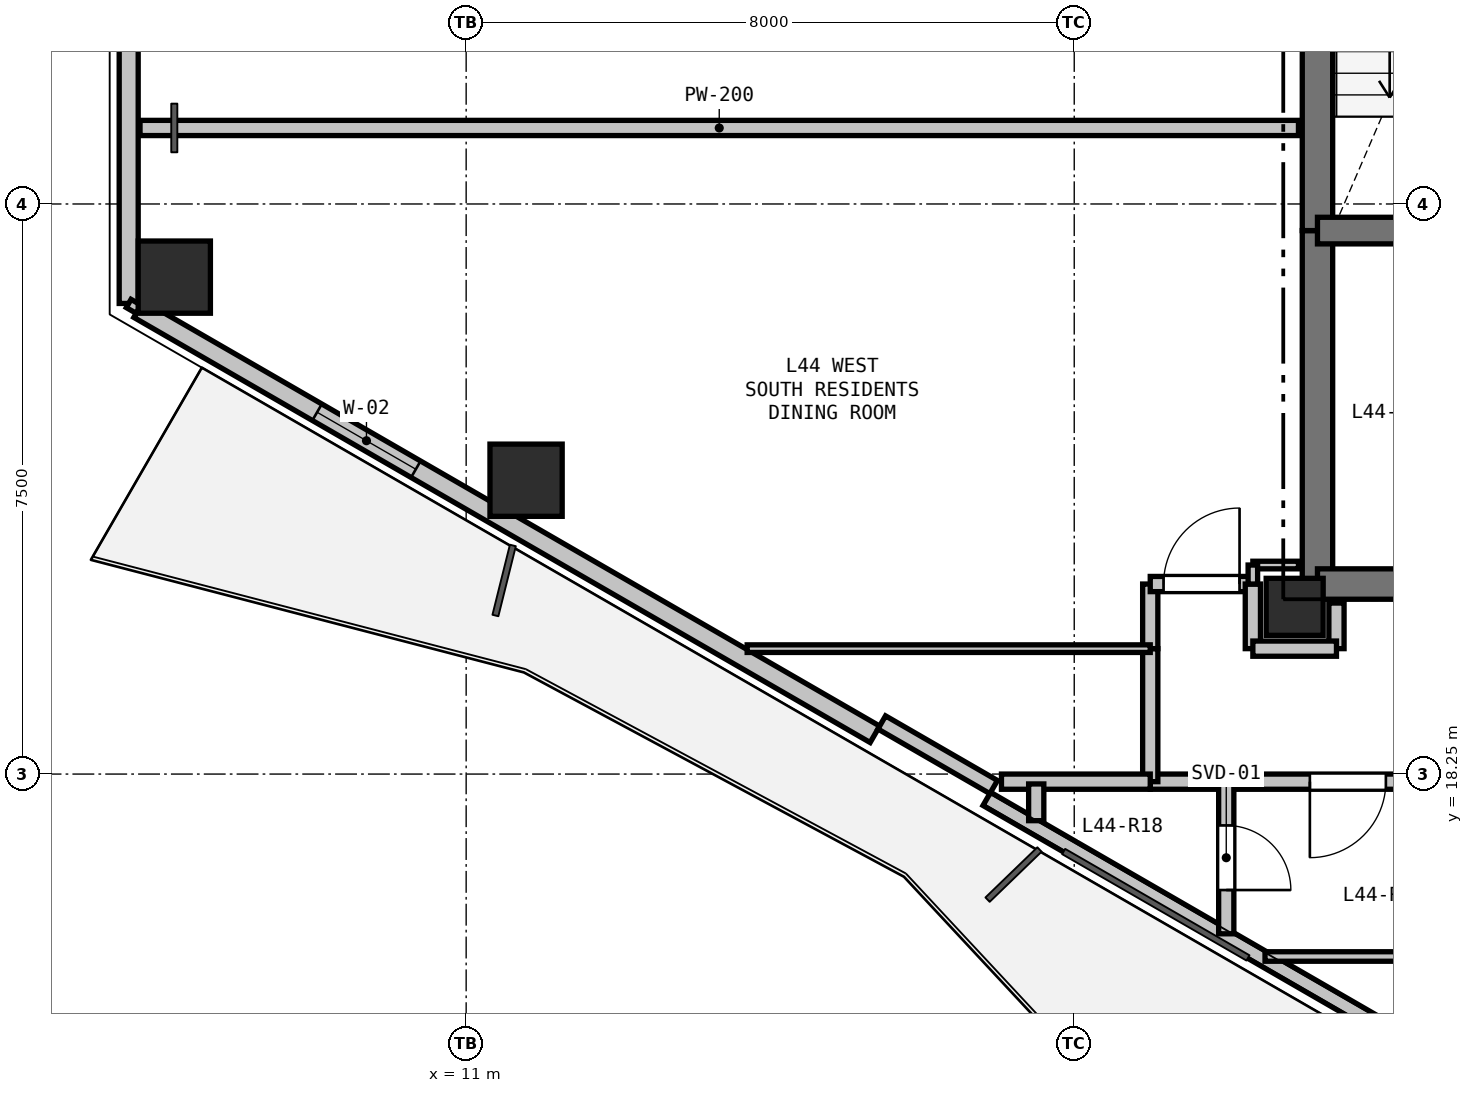
"""IFC4 building model, lengths in metres.
Left out: names, types, materials, properties, quantities, classifications, styles, units other than length and angle.
Written with IfcOpenShell. Run it as: python <this file> out.ifc"""

import sys

from ifc_helpers import new_model, si_unit, direction, frame, frame_2d, origin, origin_2d, place, context, subcontext, project, spatial, rectangle, hollow_rectangle, extrude, element, fill, save


model = new_model("IFC4")
c1 = context("Model", 3, precision=1e-05, world=origin(), true_north=direction((0.0, 1.0)))
c2 = subcontext(c1, "Body", "Model", "MODEL_VIEW")
j1 = project(units=[si_unit("LENGTHUNIT", "METRE"), si_unit("PLANEANGLEUNIT", "RADIAN")], contexts=[c1])
p1 = place(None, origin())
s1 = spatial("IfcSite", under=j1, at=p1, CompositionType="ELEMENT")
p2 = place(p1, origin())
s2 = spatial("IfcBuilding", under=s1, at=p2, CompositionType="ELEMENT")
p3 = place(p2, frame((0.0, 0.0, 157.5)))
s3 = spatial("IfcBuildingStorey", under=s2, at=p3, CompositionType="ELEMENT", Elevation=157.5)
p4 = place(p3, frame((21.9, 20.45, 0.0), z_axis=(0.0, 0.0, 1.0), x_axis=(1.0, 0.0, 0.0)))
e1 = element("IfcColumn", 1, at=p4, inside=s3, PredefinedType="COLUMN", context=c2, shape_type="SweptSolid", body=[
    extrude(rectangle(XDim=0.75, YDim=0.75, at=origin_2d()), origin(), (0.0, 0.0, 1.0), 3.3),
])
for number, where, z_axis, x_axis in (
    (2, (11.788, 22.116, 0.0), (0.0, 0.0, 1.0), (1.0, 0.0, 0.0)),
    (3, (7.16, 24.788, 0.0), (0.0, 0.0, 1.0), (1.0, 0.0, 0.0)),
):
    element("IfcColumn", number, at=place(p3, frame(where, z_axis=z_axis, x_axis=x_axis)), inside=s3, PredefinedType="COLUMN", context=c2, shape_type="SweptSolid", body=[
        extrude(hollow_rectangle(XDim=0.95, YDim=0.95, WallThickness=0.028, at=origin_2d()), origin(), (0.0, 0.0, 1.0), 3.3),
    ])
p5 = place(p3, frame((6.56, 24.441, 0.0), z_axis=(0.0, 0.0, 1.0), x_axis=(0.0, 1.0, 0.0)))
e4 = element("IfcWall", 4, at=p5, inside=s3, PredefinedType="SOLIDWALL", context=c2, shape_type="SweptSolid", body=[
    extrude(rectangle(XDim=4.617, YDim=0.25, at=frame_2d((2.309, 0.0))), origin(), (0.0, 0.0, 1.0), 2.6),
])
p6 = place(p3, frame((26.931, 12.68, 0.0), z_axis=(0.0, 0.0, 1.0), x_axis=(-0.866026619769, 0.499997893847, 0.0)))
e5 = element("IfcWall", 5, at=p6, inside=s3, PredefinedType="PARAPET", context=c2, shape_type="SweptSolid", body=[
    extrude(rectangle(XDim=10.486, YDim=0.2, at=frame_2d((5.243, 0.0))), origin(), (0.0, 0.0, 1.0), 0.2),
])
p7 = place(p3, frame((16.378, 18.773, 0.0), z_axis=(0.0, 0.0, 1.0), x_axis=(-0.866027848477, 0.499995765644, 0.0)))
e6 = element("IfcWall", 6, at=p7, inside=s3, PredefinedType="SOLIDWALL", context=c2, shape_type="SweptSolid", body=[
    extrude(rectangle(XDim=11.186, YDim=0.25, at=frame_2d((5.593, 0.0))), origin(), (0.0, 0.0, 1.0), 2.6),
])
p8 = place(p7, frame((6.974, 0.0, 0.9)))
e7 = element("IfcOpeningElement", 7, at=p8, cuts=e6, PredefinedType="OPENING", context=c2, shape_type="SweptSolid", body=[
    extrude(rectangle(XDim=1.5, YDim=1.5, at=frame_2d((0.75, 0.75))), frame((0.0, 0.135, 0.0), z_axis=(0.0, -1.0, 0.0), x_axis=(1.0, 0.0, 0.0)), (0.0, 0.0, 1.0), 0.27),
])
p9 = place(p3, frame((17.94, 18.079, 0.0), z_axis=(0.0, 0.0, 1.0), x_axis=(-0.865989465428, 0.500062241894, 0.0)))
e8 = element("IfcWall", 8, at=p9, inside=s3, PredefinedType="PARAPET", context=c2, shape_type="SweptSolid", body=[
    extrude(rectangle(XDim=1.7, YDim=0.2, at=frame_2d((0.85, 0.0))), origin(), (0.0, 0.0, 1.0), 2.6),
])
p10 = place(p3, frame((22.2, 20.75, 0.0), z_axis=(0.0, 0.0, 1.0), x_axis=(0.0, 1.0, 0.0)))
e9 = element("IfcWall", 9, at=p10, inside=s3, PredefinedType="SHEAR", context=c2, shape_type="SweptSolid", body=[
    extrude(rectangle(XDim=4.65, YDim=0.4, at=frame_2d((2.325, 0.0))), origin(), (0.0, 0.0, 1.0), 2.98),
])
p11 = place(p3, frame((22.2, 25.4, 0.0), z_axis=(0.0, 0.0, 1.0), x_axis=(0.0, 1.0, 0.0)))
e10 = element("IfcWall", 10, at=p11, inside=s3, PredefinedType="SHEAR", context=c2, shape_type="SweptSolid", body=[
    extrude(rectangle(XDim=7.35, YDim=0.4, at=frame_2d((3.675, 0.0))), origin(), (0.0, 0.0, 1.0), 2.98),
])
p12 = place(p3, frame((25.65, 20.75, 0.0), z_axis=(0.0, 0.0, 1.0), x_axis=(-1.0, 0.0, 0.0)))
e11 = element("IfcWall", 11, at=p12, inside=s3, PredefinedType="SHEAR", context=c2, shape_type="SweptSolid", body=[
    extrude(rectangle(XDim=3.45, YDim=0.4, at=frame_2d((1.725, 0.0))), origin(), (0.0, 0.0, 1.0), 2.98),
])
p13 = place(p12, frame((0.65, 0.0, 0.0)))
e12 = element("IfcOpeningElement", 12, at=p13, cuts=e11, PredefinedType="OPENING", context=c2, shape_type="SweptSolid", body=[
    extrude(rectangle(XDim=1.15, YDim=2.15, at=frame_2d((0.575, 1.075))), frame((0.0, 0.21, 0.0), z_axis=(0.0, -1.0, 0.0), x_axis=(1.0, 0.0, 0.0)), (0.0, 0.0, 1.0), 0.42),
])
p14 = place(p3, frame((22.2, 25.4, 0.0), z_axis=(0.0, 0.0, 1.0), x_axis=(1.0, 0.0, 0.0)))
e13 = element("IfcWall", 13, at=p14, inside=s3, PredefinedType="SHEAR", context=c2, shape_type="SweptSolid", body=[
    extrude(rectangle(XDim=3.45, YDim=0.35, at=frame_2d((1.725, 0.0))), origin(), (0.0, 0.0, 1.0), 2.98),
])
p15 = place(p14, frame((1.15, 0.0, 0.0)))
e14 = element("IfcOpeningElement", 14, at=p15, cuts=e13, PredefinedType="OPENING", context=c2, shape_type="SweptSolid", body=[
    extrude(rectangle(XDim=1.15, YDim=2.15, at=frame_2d((0.575, 1.075))), frame((0.0, 0.185, 0.0), z_axis=(0.0, -1.0, 0.0), x_axis=(1.0, 0.0, 0.0)), (0.0, 0.0, 1.0), 0.37),
])
p16 = place(p3, frame((22.45, 19.9, 0.0), z_axis=(0.0, 0.0, 1.0), x_axis=(0.0, 1.0, 0.0)))
e15 = element("IfcWall", 15, at=p16, inside=s3, PredefinedType="PARTITIONING", context=c2, shape_type="SweptSolid", body=[
    extrude(rectangle(XDim=0.6, YDim=0.2, at=frame_2d((0.3, 0.0))), origin(), (0.0, 0.0, 1.0), 2.428),
])
p17 = place(p3, frame((24.2, 18.15, 0.0), z_axis=(0.0, 0.0, 1.0), x_axis=(-1.0, 0.0, 0.0)))
e16 = element("IfcWall", 16, at=p17, inside=s3, PredefinedType="PARTITIONING", context=c2, shape_type="SweptSolid", body=[
    extrude(rectangle(XDim=3.2, YDim=0.2, at=frame_2d((1.6, 0.0))), origin(), (0.0, 0.0, 1.0), 2.428),
])
p18 = place(p17, frame((1.1, 0.0, 0.0)))
e17 = element("IfcOpeningElement", 17, at=p18, cuts=e16, PredefinedType="OPENING", context=c2, shape_type="SweptSolid", body=[
    extrude(rectangle(XDim=1.0, YDim=2.15, at=frame_2d((0.5, 1.075))), frame((0.0, 0.11, 0.0), z_axis=(0.0, -1.0, 0.0), x_axis=(1.0, 0.0, 0.0)), (0.0, 0.0, 1.0), 0.22),
])
p19 = place(p3, frame((21.0, 18.15, 0.0), z_axis=(0.0, 0.0, 1.0), x_axis=(-1.0, 0.0, 0.0)))
e18 = element("IfcWall", 18, at=p19, inside=s3, PredefinedType="PARTITIONING", context=c2, shape_type="SweptSolid", body=[
    extrude(rectangle(XDim=1.0, YDim=0.2, at=frame_2d((0.5, 0.0))), origin(), (0.0, 0.0, 1.0), 2.98),
])
p20 = place(p3, frame((20.0, 18.15, 0.0), z_axis=(0.0, 0.0, 1.0), x_axis=(0.0, 1.0, 0.0)))
e19 = element("IfcWall", 19, at=p20, inside=s3, PredefinedType="PARTITIONING", context=c2, shape_type="SweptSolid", body=[
    extrude(rectangle(XDim=1.75, YDim=0.2, at=frame_2d((0.875, 0.0))), origin(), (0.0, 0.0, 1.0), 2.98),
])
p21 = place(p3, frame((20.0, 19.9, 0.0), z_axis=(0.0, 0.0, 1.0), x_axis=(0.0, 1.0, 0.0)))
e20 = element("IfcWall", 20, at=p21, inside=s3, PredefinedType="PARTITIONING", context=c2, shape_type="SweptSolid", body=[
    extrude(rectangle(XDim=0.85, YDim=0.2, at=frame_2d((0.425, 0.0))), origin(), (0.0, 0.0, 1.0), 2.98),
])
p22 = place(p3, frame((20.0, 20.75, 0.0), z_axis=(0.0, 0.0, 1.0), x_axis=(1.0, 0.0, 0.0)))
e21 = element("IfcWall", 21, at=p22, inside=s3, PredefinedType="PARTITIONING", context=c2, shape_type="SweptSolid", body=[
    extrude(rectangle(XDim=1.35, YDim=0.2, at=frame_2d((0.675, 0.0))), origin(), (0.0, 0.0, 1.0), 2.428),
])
p23 = place(p22, frame((0.175, 0.0, 0.0)))
e22 = element("IfcOpeningElement", 22, at=p23, cuts=e21, PredefinedType="OPENING", context=c2, shape_type="SweptSolid", body=[
    extrude(rectangle(XDim=1.0, YDim=2.15, at=frame_2d((0.5, 1.075))), frame((0.0, 0.11, 0.0), z_axis=(0.0, -1.0, 0.0), x_axis=(1.0, 0.0, 0.0)), (0.0, 0.0, 1.0), 0.22),
])
p24 = place(p3, frame((21.35, 20.75, 0.0), z_axis=(0.0, 0.0, 1.0), x_axis=(0.0, -1.0, 0.0)))
e23 = element("IfcWall", 23, at=p24, inside=s3, PredefinedType="PARTITIONING", context=c2, shape_type="SweptSolid", body=[
    extrude(rectangle(XDim=0.85, YDim=0.2, at=frame_2d((0.425, 0.0))), origin(), (0.0, 0.0, 1.0), 2.428),
])
p25 = place(p3, frame((21.35, 19.9, 0.0), z_axis=(0.0, 0.0, 1.0), x_axis=(1.0, 0.0, 0.0)))
e24 = element("IfcWall", 24, at=p25, inside=s3, PredefinedType="PARTITIONING", context=c2, shape_type="SweptSolid", body=[
    extrude(rectangle(XDim=1.1, YDim=0.2, at=frame_2d((0.55, 0.0))), origin(), (0.0, 0.0, 1.0), 2.428),
])
p26 = place(p3, frame((6.709, 26.75, 0.0), z_axis=(0.0, 0.0, 1.0), x_axis=(1.0, 0.0, 0.0)))
e25 = element("IfcWall", 25, at=p26, inside=s3, PredefinedType="PARTITIONING", context=c2, shape_type="SweptSolid", body=[
    extrude(rectangle(XDim=15.241, YDim=0.2, at=frame_2d((7.62, 0.0))), origin(), (0.0, 0.0, 1.0), 2.505),
])
p27 = place(p3, frame((21.95, 21.0, 0.0), z_axis=(0.0, 0.0, 1.0), x_axis=(-1.0, 0.0, 0.0)))
e26 = element("IfcWall", 26, at=p27, inside=s3, PredefinedType="PARTITIONING", context=c2, shape_type="SweptSolid", body=[
    extrude(rectangle(XDim=0.6, YDim=0.1, at=frame_2d((0.3, 0.0))), origin(), (0.0, 0.0, 1.0), 2.505),
])
p28 = place(p3, frame((21.35, 21.0, 0.0), z_axis=(0.0, 0.0, 1.0), x_axis=(0.0, -1.0, 0.0)))
e27 = element("IfcWall", 27, at=p28, inside=s3, PredefinedType="PARTITIONING", context=c2, shape_type="SweptSolid", body=[
    extrude(rectangle(XDim=0.25, YDim=0.125, at=frame_2d((0.125, 0.0))), origin(), (0.0, 0.0, 1.0), 2.98),
])
p29 = place(p3, frame((20.0, 19.9, 0.0), z_axis=(0.0, 0.0, 1.0), x_axis=(-1.0, 0.0, 0.0)))
e28 = element("IfcWall", 28, at=p29, inside=s3, PredefinedType="PARTITIONING", context=c2, shape_type="SweptSolid", body=[
    extrude(rectangle(XDim=5.303, YDim=0.1, at=frame_2d((2.651, 0.0))), origin(), (0.0, 0.0, 1.0), 2.365),
])
p30 = place(p3, frame((6.69, 24.366, 0.0), z_axis=(0.0, 0.0, 1.0), x_axis=(-0.866131372301, 0.499816412211, 0.0)))
e29 = element("IfcWall", 29, at=p30, inside=s3, PredefinedType="PARTITIONING", context=c2, shape_type="SweptSolid", body=[
    extrude(rectangle(XDim=0.15, YDim=0.125, at=frame_2d((0.075, 0.0))), origin(), (0.0, 0.0, 1.0), 2.98),
])
p31 = place(p3, frame((18.042, 18.15, 0.0), z_axis=(0.0, 0.0, 1.0), x_axis=(1.0, 0.0, 0.0)))
e30 = element("IfcWall", 30, at=p31, inside=s3, PredefinedType="PARTITIONING", context=c2, shape_type="SweptSolid", body=[
    extrude(rectangle(XDim=1.958, YDim=0.2, at=frame_2d((0.979, 0.0))), origin(), (0.0, 0.0, 1.0), 2.365),
])
p32 = place(p3, frame((21.0, 18.15, 0.0), z_axis=(0.0, 0.0, 1.0), x_axis=(0.0, -1.0, 0.0)))
e31 = element("IfcWall", 31, at=p32, inside=s3, PredefinedType="PARTITIONING", context=c2, shape_type="SweptSolid", body=[
    extrude(rectangle(XDim=2.001, YDim=0.2, at=frame_2d((1.001, 0.0))), origin(), (0.0, 0.0, 1.0), 2.365),
])
p33 = place(p32, frame((0.576, 0.0, 0.0)))
e32 = element("IfcOpeningElement", 32, at=p33, cuts=e31, PredefinedType="OPENING", context=c2, shape_type="SweptSolid", body=[
    extrude(rectangle(XDim=0.85, YDim=2.1, at=frame_2d((0.425, 1.05))), frame((0.0, 0.11, 0.0), z_axis=(0.0, -1.0, 0.0), x_axis=(1.0, 0.0, 0.0)), (0.0, 0.0, 1.0), 0.22),
])
p34 = place(p3, frame((18.5, 17.637, 0.0), z_axis=(0.0, 0.0, 1.0), x_axis=(0.0, 1.0, 0.0)))
e33 = element("IfcWall", 33, at=p34, inside=s3, PredefinedType="PARTITIONING", context=c2, shape_type="SweptSolid", body=[
    extrude(rectangle(XDim=0.483, YDim=0.2, at=frame_2d((0.242, 0.0))), origin(), (0.0, 0.0, 1.0), 2.365),
])
p35 = place(p3, frame((24.2, 15.85, 0.0), z_axis=(0.0, 0.0, 1.0), x_axis=(-1.0, 0.0, 0.0)))
e34 = element("IfcWall", 34, at=p35, inside=s3, PredefinedType="PARTITIONING", context=c2, shape_type="SweptSolid", body=[
    extrude(rectangle(XDim=2.69, YDim=0.125, at=frame_2d((1.345, 0.0))), origin(), (0.0, 0.0, 1.0), 2.365),
])
p36 = place(p8, origin())
e35 = element("IfcWindow", 35, at=p36, inside=s3, PartitioningType="SINGLE_PANEL", PredefinedType="WINDOW", context=c2, shape_type="SweptSolid", body=[
    extrude(rectangle(XDim=1.5, YDim=1.5, at=frame_2d((0.75, 0.75))), frame((0.0, 0.03, 0.0), z_axis=(0.0, -1.0, 0.0), x_axis=(1.0, 0.0, 0.0)), (0.0, 0.0, 1.0), 0.06),
])
fill(e7, e35)
p37 = place(p23, origin())
e36 = element("IfcDoor", 36, at=p37, inside=s3, OperationType="SINGLE_SWING_RIGHT", PredefinedType="DOOR", context=c2, shape_type="SweptSolid", body=[
    extrude(rectangle(XDim=1.0, YDim=2.15, at=frame_2d((0.5, 1.075))), frame((0.0, 0.025, 0.0), z_axis=(0.0, -1.0, 0.0), x_axis=(1.0, 0.0, 0.0)), (0.0, 0.0, 1.0), 0.05),
])
fill(e22, e36)
p38 = place(p18, origin())
e37 = element("IfcDoor", 37, at=p38, inside=s3, OperationType="SINGLE_SWING_RIGHT", PredefinedType="DOOR", context=c2, shape_type="SweptSolid", body=[
    extrude(rectangle(XDim=1.0, YDim=2.15, at=frame_2d((0.5, 1.075))), frame((0.0, 0.025, 0.0), z_axis=(0.0, -1.0, 0.0), x_axis=(1.0, 0.0, 0.0)), (0.0, 0.0, 1.0), 0.05),
])
fill(e17, e37)
p39 = place(p33, origin())
e38 = element("IfcDoor", 38, at=p39, inside=s3, OperationType="SINGLE_SWING_RIGHT", PredefinedType="DOOR", context=c2, shape_type="SweptSolid", body=[
    extrude(rectangle(XDim=0.85, YDim=2.1, at=frame_2d((0.425, 1.05))), frame((0.0, 0.025, 0.0), z_axis=(0.0, -1.0, 0.0), x_axis=(1.0, 0.0, 0.0)), (0.0, 0.0, 1.0), 0.05),
])
fill(e32, e38)
save(model, sys.argv[1])
